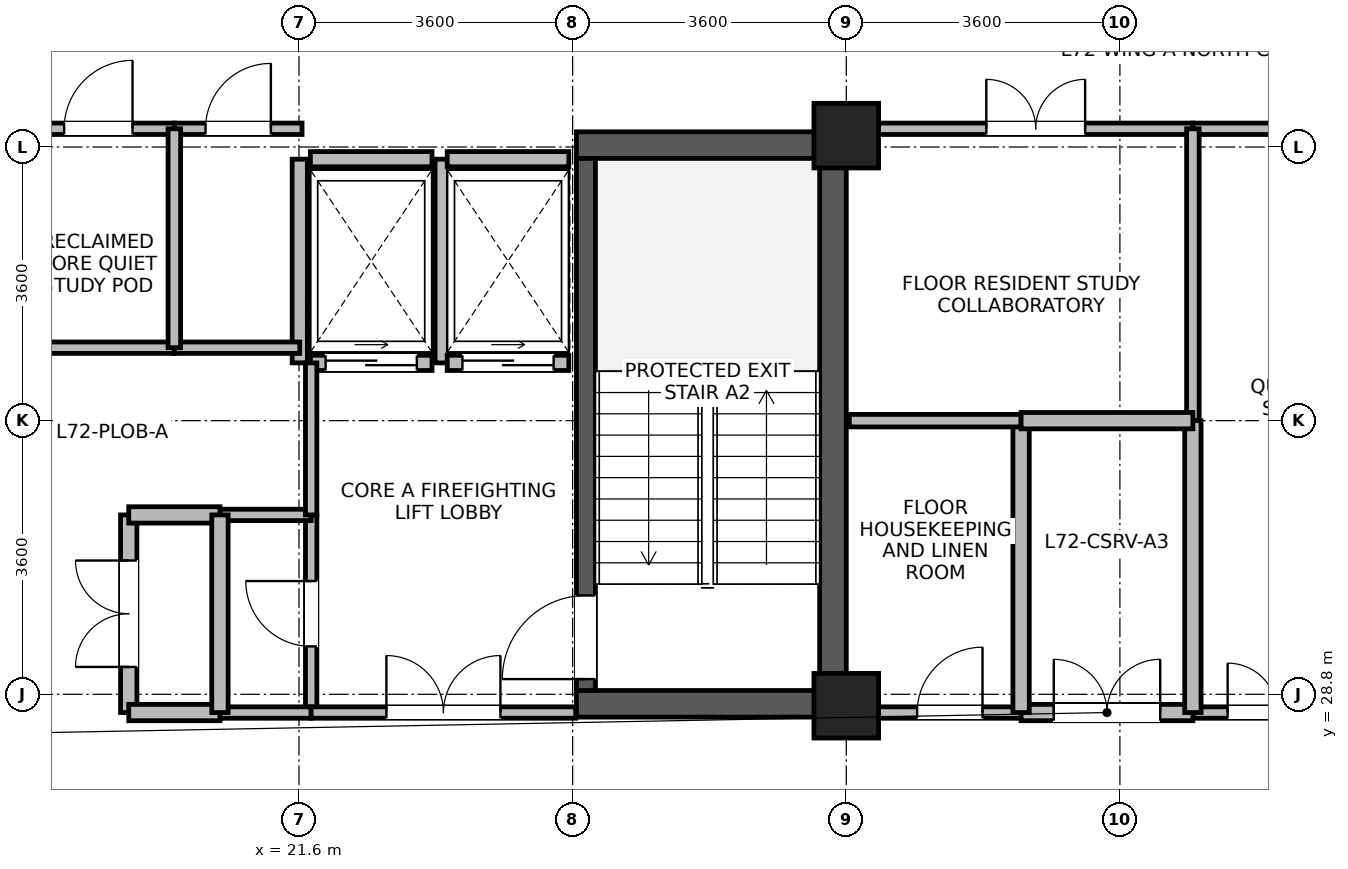
"""IFC4 building model, lengths in metres.
Left out: names, types, materials, properties, quantities, classifications, styles, units other than length and angle.
Written with IfcOpenShell. Run it as: python <this file> out.ifc"""

import sys

from ifc_helpers import new_model, si_unit, direction, frame, frame_2d, origin, origin_2d, place, context, subcontext, project, spatial, rectangle, extrude, source, transform, mapped, element, fill, save


model = new_model("IFC4")
c1 = context("Model", 3, precision=1e-05, world=origin(), true_north=direction((0.0, 1.0)))
c2 = subcontext(c1, "Body", "Model", "MODEL_VIEW")
j1 = project(units=[si_unit("LENGTHUNIT", "METRE"), si_unit("PLANEANGLEUNIT", "RADIAN")], contexts=[c1])
p1 = place(None, origin())
s1 = spatial("IfcSite", under=j1, at=p1, CompositionType="ELEMENT")
p2 = place(p1, origin())
s2 = spatial("IfcBuilding", under=s1, at=p2, CompositionType="ELEMENT")
p3 = place(p2, frame((0.0, 0.0, 279.5)))
s3 = spatial("IfcBuildingStorey", under=s2, at=p3, CompositionType="ELEMENT", Elevation=279.5)
p4 = place(p3, frame((28.625, 28.5, 0.0), z_axis=(0.0, 0.0, 1.0), x_axis=(0.0, 1.0, 0.0)))
e1 = element("IfcWall", 1, at=p4, inside=s3, PredefinedType="SHEAR", context=c2, shape_type="SweptSolid", body=[
    extrude(rectangle(XDim=7.7, YDim=0.35, at=frame_2d((3.85, 0.0))), origin(), (0.0, 0.0, 1.0), 3.475),
])
for number, where, z_axis, x_axis in (
    (2, (25.25, 28.675, 0.0), (0.0, 0.0, 1.0), (1.0, 0.0, 0.0)),
    (3, (25.25, 36.025, 0.0), (0.0, 0.0, 1.0), (1.0, 0.0, 0.0)),
):
    element("IfcWall", number, at=place(p3, frame(where, z_axis=z_axis, x_axis=x_axis)), inside=s3, PredefinedType="SHEAR", context=c2, shape_type="SweptSolid", body=[
        extrude(rectangle(XDim=3.2, YDim=0.35, at=frame_2d((1.6, 0.0))), origin(), (0.0, 0.0, 1.0), 3.475),
    ])
p5 = place(p3, frame((25.375, 28.85, 0.0), z_axis=(0.0, 0.0, 1.0), x_axis=(0.0, 1.0, 0.0)))
e4 = element("IfcWall", 4, at=p5, inside=s3, PredefinedType="SHEAR", context=c2, shape_type="SweptSolid", body=[
    extrude(rectangle(XDim=7.0, YDim=0.25, at=frame_2d((3.5, 0.0))), origin(), (0.0, 0.0, 1.0), 3.475),
])
p6 = place(p5, frame((0.15, 0.0, 0.0)))
e5 = element("IfcOpeningElement", 5, at=p6, cuts=e4, PredefinedType="OPENING", context=c2, shape_type="SweptSolid", body=[
    extrude(rectangle(XDim=1.1, YDim=2.08, at=frame_2d((0.55, 1.04))), frame((0.0, 0.135, 0.0), z_axis=(0.0, -1.0, 0.0), x_axis=(1.0, 0.0, 0.0)), (0.0, 0.0, 1.0), 0.27),
])
m1 = source(origin(), c2, "Body", "SweptSolid", [
    extrude(rectangle(XDim=0.85, YDim=0.85, at=origin_2d()), origin(), (0.0, 0.0, 1.0), 3.7),
])
for number, where, z_axis, x_axis in (
    (6, (28.8, 28.65, 0.0), (0.0, 0.0, 1.0), (1.0, 0.0, 0.0)),
    (7, (28.8, 36.15, 0.0), (0.0, 0.0, 1.0), (1.0, 0.0, 0.0)),
):
    element("IfcColumn", number, at=place(p3, frame(where, z_axis=z_axis, x_axis=x_axis)), inside=s3, PredefinedType="COLUMN", context=c2, shape_type="MappedRepresentation", body=[
        mapped(m1, transform((0.0, 0.0, 0.0), x_axis=(1.0, 0.0, 0.0), y_axis=(0.0, 1.0, 0.0), z_axis=(0.0, 0.0, 1.0), scale=1.0)),
    ])
p7 = place(p3, frame((21.75, 33.16, 0.0), z_axis=(0.0, 0.0, 1.0), x_axis=(1.0, 0.0, 0.0)))
e8 = element("IfcWall", 8, at=p7, inside=s3, PredefinedType="PARTITIONING", context=c2, shape_type="SweptSolid", body=[
    extrude(rectangle(XDim=1.6, YDim=0.2, at=frame_2d((0.8, 0.0))), origin(), (0.0, 0.0, 1.0), 3.455),
])
p8 = place(p7, frame((0.2, 0.0, 0.0)))
e9 = element("IfcOpeningElement", 9, at=p8, cuts=e8, PredefinedType="OPENING", context=c2, shape_type="SweptSolid", body=[
    extrude(rectangle(XDim=1.2, YDim=2.12, at=frame_2d((0.6, 1.06))), frame((0.0, 0.11, 0.0), z_axis=(0.0, -1.0, 0.0), x_axis=(1.0, 0.0, 0.0)), (0.0, 0.0, 1.0), 0.22),
])
p9 = place(p3, frame((21.75, 35.84, 0.0), z_axis=(0.0, 0.0, 1.0), x_axis=(1.0, 0.0, 0.0)))
e10 = element("IfcWall", 10, at=p9, inside=s3, PredefinedType="PARTITIONING", context=c2, shape_type="SweptSolid", body=[
    extrude(rectangle(XDim=1.6, YDim=0.2, at=frame_2d((0.8, 0.0))), origin(), (0.0, 0.0, 1.0), 2.555),
])
for number, where, z_axis, x_axis in (
    (11, (21.61, 33.16, 0.0), (0.0, 0.0, 1.0), (0.0, 1.0, 0.0)),
    (12, (23.49, 33.16, 0.0), (0.0, 0.0, 1.0), (0.0, 1.0, 0.0)),
):
    element("IfcWall", number, at=place(p3, frame(where, z_axis=z_axis, x_axis=x_axis)), inside=s3, PredefinedType="PARTITIONING", context=c2, shape_type="SweptSolid", body=[
        extrude(rectangle(XDim=2.68, YDim=0.2, at=frame_2d((1.34, 0.0))), origin(), (0.0, 0.0, 1.0), 3.455),
    ])
p10 = place(p3, frame((23.55, 33.16, 0.0), z_axis=(0.0, 0.0, 1.0), x_axis=(1.0, 0.0, 0.0)))
e13 = element("IfcWall", 13, at=p10, inside=s3, PredefinedType="PARTITIONING", context=c2, shape_type="SweptSolid", body=[
    extrude(rectangle(XDim=1.6, YDim=0.2, at=frame_2d((0.8, 0.0))), origin(), (0.0, 0.0, 1.0), 3.455),
])
p11 = place(p10, frame((0.2, 0.0, 0.0)))
e14 = element("IfcOpeningElement", 14, at=p11, cuts=e13, PredefinedType="OPENING", context=c2, shape_type="SweptSolid", body=[
    extrude(rectangle(XDim=1.2, YDim=2.12, at=frame_2d((0.6, 1.06))), frame((0.0, 0.11, 0.0), z_axis=(0.0, -1.0, 0.0), x_axis=(1.0, 0.0, 0.0)), (0.0, 0.0, 1.0), 0.22),
])
p12 = place(p3, frame((23.55, 35.84, 0.0), z_axis=(0.0, 0.0, 1.0), x_axis=(1.0, 0.0, 0.0)))
e15 = element("IfcWall", 15, at=p12, inside=s3, PredefinedType="PARTITIONING", context=c2, shape_type="SweptSolid", body=[
    extrude(rectangle(XDim=1.6, YDim=0.2, at=frame_2d((0.8, 0.0))), origin(), (0.0, 0.0, 1.0), 2.555),
])
p13 = place(p3, frame((29.225, 36.24, 0.0), z_axis=(0.0, 0.0, 1.0), x_axis=(1.0, 0.0, 0.0)))
e16 = element("IfcWall", 16, at=p13, inside=s3, PredefinedType="PARTITIONING", context=c2, shape_type="SweptSolid", body=[
    extrude(rectangle(XDim=4.135, YDim=0.15, at=frame_2d((2.067, 0.0))), origin(), (0.0, 0.0, 1.0), 2.905),
])
p14 = place(p13, frame((1.417, 0.0, 0.0)))
e17 = element("IfcOpeningElement", 17, at=p14, cuts=e16, PredefinedType="OPENING", context=c2, shape_type="SweptSolid", body=[
    extrude(rectangle(XDim=1.3, YDim=2.12, at=frame_2d((0.65, 1.06))), frame((0.0, 0.085, 0.0), z_axis=(0.0, -1.0, 0.0), x_axis=(1.0, 0.0, 0.0)), (0.0, 0.0, 1.0), 0.17),
])
p15 = place(p3, frame((33.36, 28.56, 0.0), z_axis=(0.0, 0.0, 1.0), x_axis=(1.0, 0.0, 0.0)))
e18 = element("IfcWall", 18, at=p15, inside=s3, PredefinedType="PARTITIONING", context=c2, shape_type="SweptSolid", body=[
    extrude(rectangle(XDim=2.215, YDim=0.15, at=frame_2d((1.107, 0.0))), origin(), (0.0, 0.0, 1.0), 2.905),
])
p16 = place(p15, frame((0.458, 0.0, 0.0)))
e19 = element("IfcOpeningElement", 19, at=p16, cuts=e18, PredefinedType="OPENING", context=c2, shape_type="SweptSolid", body=[
    extrude(rectangle(XDim=1.3, YDim=2.12, at=frame_2d((0.65, 1.06))), frame((0.0, 0.085, 0.0), z_axis=(0.0, -1.0, 0.0), x_axis=(1.0, 0.0, 0.0)), (0.0, 0.0, 1.0), 0.17),
])
p17 = place(p3, frame((33.36, 36.24, 0.0), z_axis=(0.0, 0.0, 1.0), x_axis=(1.0, 0.0, 0.0)))
e20 = element("IfcWall", 20, at=p17, inside=s3, PredefinedType="PARTITIONING", context=c2, shape_type="SweptSolid", body=[
    extrude(rectangle(XDim=2.215, YDim=0.15, at=frame_2d((1.107, 0.0))), origin(), (0.0, 0.0, 1.0), 2.905),
])
p18 = place(p3, frame((19.36, 28.56, 0.0), z_axis=(0.0, 0.0, 1.0), x_axis=(0.0, 1.0, 0.0)))
e21 = element("IfcWall", 21, at=p18, inside=s3, PredefinedType="PARTITIONING", context=c2, shape_type="SweptSolid", body=[
    extrude(rectangle(XDim=2.6, YDim=0.215, at=frame_2d((1.3, 0.0))), origin(), (0.0, 0.0, 1.0), 3.455),
])
p19 = place(p18, frame((0.6, 0.0, 0.0)))
e22 = element("IfcOpeningElement", 22, at=p19, cuts=e21, PredefinedType="OPENING", context=c2, shape_type="SweptSolid", body=[
    extrude(rectangle(XDim=1.4, YDim=2.15, at=frame_2d((0.7, 1.075))), frame((0.0, 0.118, 0.0), z_axis=(0.0, -1.0, 0.0), x_axis=(1.0, 0.0, 0.0)), (0.0, 0.0, 1.0), 0.235),
])
p20 = place(p3, frame((21.76, 28.56, 0.0), z_axis=(0.0, 0.0, 1.0), x_axis=(0.0, 1.0, 0.0)))
e23 = element("IfcWall", 23, at=p20, inside=s3, PredefinedType="PARTITIONING", context=c2, shape_type="SweptSolid", body=[
    extrude(rectangle(XDim=2.6, YDim=0.15, at=frame_2d((1.3, 0.0))), origin(), (0.0, 0.0, 1.0), 3.455),
])
p21 = place(p20, frame((0.87, 0.0, 0.0)))
e24 = element("IfcOpeningElement", 24, at=p21, cuts=e23, PredefinedType="OPENING", context=c2, shape_type="SweptSolid", body=[
    extrude(rectangle(XDim=0.86, YDim=2.02, at=frame_2d((0.43, 1.01))), frame((0.0, 0.085, 0.0), z_axis=(0.0, -1.0, 0.0), x_axis=(1.0, 0.0, 0.0)), (0.0, 0.0, 1.0), 0.17),
])
p22 = place(p3, frame((29.225, 28.56, 0.0), z_axis=(0.0, 0.0, 1.0), x_axis=(1.0, 0.0, 0.0)))
e25 = element("IfcWall", 25, at=p22, inside=s3, PredefinedType="PARTITIONING", context=c2, shape_type="SweptSolid", body=[
    extrude(rectangle(XDim=1.875, YDim=0.15, at=frame_2d((0.938, 0.0))), origin(), (0.0, 0.0, 1.0), 2.905),
])
p23 = place(p22, frame((0.508, 0.0, 0.0)))
e26 = element("IfcOpeningElement", 26, at=p23, cuts=e25, PredefinedType="OPENING", context=c2, shape_type="SweptSolid", body=[
    extrude(rectangle(XDim=0.86, YDim=2.02, at=frame_2d((0.43, 1.01))), frame((0.0, 0.085, 0.0), z_axis=(0.0, -1.0, 0.0), x_axis=(1.0, 0.0, 0.0)), (0.0, 0.0, 1.0), 0.17),
])
p24 = place(p3, frame((31.1, 28.56, 0.0), z_axis=(0.0, 0.0, 1.0), x_axis=(1.0, 0.0, 0.0)))
e27 = element("IfcWall", 27, at=p24, inside=s3, PredefinedType="PARTITIONING", context=c2, shape_type="SweptSolid", body=[
    extrude(rectangle(XDim=2.26, YDim=0.215, at=frame_2d((1.13, 0.0))), origin(), (0.0, 0.0, 1.0), 2.905),
])
p25 = place(p24, frame((0.43, 0.0, 0.0)))
e28 = element("IfcOpeningElement", 28, at=p25, cuts=e27, PredefinedType="OPENING", context=c2, shape_type="SweptSolid", body=[
    extrude(rectangle(XDim=1.4, YDim=2.15, at=frame_2d((0.7, 1.075))), frame((0.0, 0.118, 0.0), z_axis=(0.0, -1.0, 0.0), x_axis=(1.0, 0.0, 0.0)), (0.0, 0.0, 1.0), 0.235),
])
p26 = place(p3, frame((17.96, 33.36, 0.0), z_axis=(0.0, 0.0, 1.0), x_axis=(1.0, 0.0, 0.0)))
e29 = element("IfcWall", 29, at=p26, inside=s3, PredefinedType="PARTITIONING", context=c2, shape_type="SweptSolid", body=[
    extrude(rectangle(XDim=2.0, YDim=0.15, at=frame_2d((1.0, 0.0))), origin(), (0.0, 0.0, 1.0), 3.455),
])
p27 = place(p3, frame((17.96, 36.24, 0.0), z_axis=(0.0, 0.0, 1.0), x_axis=(1.0, 0.0, 0.0)))
e30 = element("IfcWall", 30, at=p27, inside=s3, PredefinedType="PARTITIONING", context=c2, shape_type="SweptSolid", body=[
    extrude(rectangle(XDim=2.0, YDim=0.15, at=frame_2d((1.0, 0.0))), origin(), (0.0, 0.0, 1.0), 2.555),
])
p28 = place(p27, frame((0.55, 0.0, 0.0)))
e31 = element("IfcOpeningElement", 31, at=p28, cuts=e30, PredefinedType="OPENING", context=c2, shape_type="SweptSolid", body=[
    extrude(rectangle(XDim=0.9, YDim=2.08, at=frame_2d((0.45, 1.04))), frame((0.0, 0.085, 0.0), z_axis=(0.0, -1.0, 0.0), x_axis=(1.0, 0.0, 0.0)), (0.0, 0.0, 1.0), 0.17),
])
p29 = place(p3, frame((19.96, 33.36, 0.0), z_axis=(0.0, 0.0, 1.0), x_axis=(1.0, 0.0, 0.0)))
e32 = element("IfcWall", 32, at=p29, inside=s3, PredefinedType="PARTITIONING", context=c2, shape_type="SweptSolid", body=[
    extrude(rectangle(XDim=1.65, YDim=0.15, at=frame_2d((0.825, 0.0))), origin(), (0.0, 0.0, 1.0), 3.455),
])
p30 = place(p3, frame((19.96, 36.24, 0.0), z_axis=(0.0, 0.0, 1.0), x_axis=(1.0, 0.0, 0.0)))
e33 = element("IfcWall", 33, at=p30, inside=s3, PredefinedType="PARTITIONING", context=c2, shape_type="SweptSolid", body=[
    extrude(rectangle(XDim=1.68, YDim=0.15, at=frame_2d((0.84, 0.0))), origin(), (0.0, 0.0, 1.0), 2.555),
])
p31 = place(p30, frame((0.41, 0.0, 0.0)))
e34 = element("IfcOpeningElement", 34, at=p31, cuts=e33, PredefinedType="OPENING", context=c2, shape_type="SweptSolid", body=[
    extrude(rectangle(XDim=0.86, YDim=2.02, at=frame_2d((0.43, 1.01))), frame((0.0, 0.085, 0.0), z_axis=(0.0, -1.0, 0.0), x_axis=(1.0, 0.0, 0.0)), (0.0, 0.0, 1.0), 0.17),
])
p32 = place(p3, frame((20.56, 28.56, 0.0), z_axis=(0.0, 0.0, 1.0), x_axis=(1.0, 0.0, 0.0)))
e35 = element("IfcWall", 35, at=p32, inside=s3, PredefinedType="PARTITIONING", context=c2, shape_type="SweptSolid", body=[
    extrude(rectangle(XDim=1.2, YDim=0.15, at=frame_2d((0.6, 0.0))), origin(), (0.0, 0.0, 1.0), 2.555),
])
p33 = place(p3, frame((20.56, 31.16, 0.0), z_axis=(0.0, 0.0, 1.0), x_axis=(1.0, 0.0, 0.0)))
e36 = element("IfcWall", 36, at=p33, inside=s3, PredefinedType="PARTITIONING", context=c2, shape_type="SweptSolid", body=[
    extrude(rectangle(XDim=1.2, YDim=0.15, at=frame_2d((0.6, 0.0))), origin(), (0.0, 0.0, 1.0), 3.455),
])
p34 = place(p3, frame((19.36, 28.56, 0.0), z_axis=(0.0, 0.0, 1.0), x_axis=(1.0, 0.0, 0.0)))
e37 = element("IfcWall", 37, at=p34, inside=s3, PredefinedType="PARTITIONING", context=c2, shape_type="SweptSolid", body=[
    extrude(rectangle(XDim=1.2, YDim=0.215, at=frame_2d((0.6, 0.0))), origin(), (0.0, 0.0, 1.0), 2.555),
])
p35 = place(p3, frame((19.36, 31.16, 0.0), z_axis=(0.0, 0.0, 1.0), x_axis=(1.0, 0.0, 0.0)))
e38 = element("IfcWall", 38, at=p35, inside=s3, PredefinedType="PARTITIONING", context=c2, shape_type="SweptSolid", body=[
    extrude(rectangle(XDim=1.2, YDim=0.215, at=frame_2d((0.6, 0.0))), origin(), (0.0, 0.0, 1.0), 3.455),
])
p36 = place(p3, frame((33.36, 32.4, 0.0), z_axis=(0.0, 0.0, 1.0), x_axis=(0.0, 1.0, 0.0)))
e39 = element("IfcWall", 39, at=p36, inside=s3, PredefinedType="PARTITIONING", context=c2, shape_type="SweptSolid", body=[
    extrude(rectangle(XDim=3.84, YDim=0.165, at=frame_2d((1.92, 0.0))), origin(), (0.0, 0.0, 1.0), 3.455),
])
for number, where, z_axis, x_axis in (
    (40, (31.1, 28.56, 0.0), (0.0, 0.0, 1.0), (0.0, 1.0, 0.0)),
    (41, (33.36, 28.56, 0.0), (0.0, 0.0, 1.0), (0.0, 1.0, 0.0)),
):
    element("IfcWall", number, at=place(p3, frame(where, z_axis=z_axis, x_axis=x_axis)), inside=s3, PredefinedType="PARTITIONING", context=c2, shape_type="SweptSolid", body=[
        extrude(rectangle(XDim=3.84, YDim=0.215, at=frame_2d((1.92, 0.0))), origin(), (0.0, 0.0, 1.0), 3.455),
    ])
p37 = place(p3, frame((21.76, 28.56, 0.0), z_axis=(0.0, 0.0, 1.0), x_axis=(1.0, 0.0, 0.0)))
e42 = element("IfcWall", 42, at=p37, inside=s3, PredefinedType="PARTITIONING", context=c2, shape_type="SweptSolid", body=[
    extrude(rectangle(XDim=3.48, YDim=0.15, at=frame_2d((1.74, 0.0))), origin(), (0.0, 0.0, 1.0), 2.555),
])
p38 = place(p37, frame((0.99, 0.0, 0.0)))
e43 = element("IfcOpeningElement", 43, at=p38, cuts=e42, PredefinedType="OPENING", context=c2, shape_type="SweptSolid", body=[
    extrude(rectangle(XDim=1.5, YDim=2.1, at=frame_2d((0.75, 1.05))), frame((0.0, 0.085, 0.0), z_axis=(0.0, -1.0, 0.0), x_axis=(1.0, 0.0, 0.0)), (0.0, 0.0, 1.0), 0.17),
])
p39 = place(p3, frame((19.96, 33.36, 0.0), z_axis=(0.0, 0.0, 1.0), x_axis=(0.0, 1.0, 0.0)))
e44 = element("IfcWall", 44, at=p39, inside=s3, PredefinedType="PARTITIONING", context=c2, shape_type="SweptSolid", body=[
    extrude(rectangle(XDim=2.88, YDim=0.165, at=frame_2d((1.44, 0.0))), origin(), (0.0, 0.0, 1.0), 3.455),
])
p40 = place(p3, frame((20.56, 28.56, 0.0), z_axis=(0.0, 0.0, 1.0), x_axis=(0.0, 1.0, 0.0)))
e45 = element("IfcWall", 45, at=p40, inside=s3, PredefinedType="PARTITIONING", context=c2, shape_type="SweptSolid", body=[
    extrude(rectangle(XDim=2.6, YDim=0.215, at=frame_2d((1.3, 0.0))), origin(), (0.0, 0.0, 1.0), 3.455),
])
p41 = place(p3, frame((28.84, 32.4, 0.0), z_axis=(0.0, 0.0, 1.0), x_axis=(1.0, 0.0, 0.0)))
e46 = element("IfcWall", 46, at=p41, inside=s3, PredefinedType="PARTITIONING", context=c2, shape_type="SweptSolid", body=[
    extrude(rectangle(XDim=2.26, YDim=0.165, at=frame_2d((1.13, 0.0))), origin(), (0.0, 0.0, 1.0), 3.455),
])
p42 = place(p3, frame((31.1, 32.4, 0.0), z_axis=(0.0, 0.0, 1.0), x_axis=(1.0, 0.0, 0.0)))
e47 = element("IfcWall", 47, at=p42, inside=s3, PredefinedType="PARTITIONING", context=c2, shape_type="SweptSolid", body=[
    extrude(rectangle(XDim=2.26, YDim=0.215, at=frame_2d((1.13, 0.0))), origin(), (0.0, 0.0, 1.0), 3.455),
])
p43 = place(p3, frame((21.76, 31.16, 0.0), z_axis=(0.0, 0.0, 1.0), x_axis=(0.0, 1.0, 0.0)))
e48 = element("IfcWall", 48, at=p43, inside=s3, PredefinedType="PARTITIONING", context=c2, shape_type="SweptSolid", body=[
    extrude(rectangle(XDim=2.0, YDim=0.15, at=frame_2d((1.0, 0.0))), origin(), (0.0, 0.0, 1.0), 3.455),
])
p44 = place(p6, origin())
e49 = element("IfcDoor", 49, at=p44, inside=s3, OperationType="SINGLE_SWING_LEFT", PredefinedType="DOOR", context=c2, shape_type="SweptSolid", body=[
    extrude(rectangle(XDim=1.1, YDim=2.08, at=frame_2d((0.55, 1.04))), frame((0.0, 0.025, 0.0), z_axis=(0.0, -1.0, 0.0), x_axis=(1.0, 0.0, 0.0)), (0.0, 0.0, 1.0), 0.05),
])
fill(e5, e49)
p45 = place(p8, origin())
e50 = element("IfcDoor", 50, at=p45, inside=s3, OperationType="SLIDING_TO_RIGHT", PredefinedType="DOOR", context=c2, shape_type="SweptSolid", body=[
    extrude(rectangle(XDim=1.2, YDim=2.12, at=frame_2d((0.6, 1.06))), frame((0.0, 0.025, 0.0), z_axis=(0.0, -1.0, 0.0), x_axis=(1.0, 0.0, 0.0)), (0.0, 0.0, 1.0), 0.05),
])
fill(e9, e50)
p46 = place(p11, origin())
e51 = element("IfcDoor", 51, at=p46, inside=s3, OperationType="SLIDING_TO_RIGHT", PredefinedType="DOOR", context=c2, shape_type="SweptSolid", body=[
    extrude(rectangle(XDim=1.2, YDim=2.12, at=frame_2d((0.6, 1.06))), frame((0.0, 0.025, 0.0), z_axis=(0.0, -1.0, 0.0), x_axis=(1.0, 0.0, 0.0)), (0.0, 0.0, 1.0), 0.05),
])
fill(e14, e51)
p47 = place(p14, origin())
e52 = element("IfcDoor", 52, at=p47, inside=s3, OperationType="DOUBLE_DOOR_SINGLE_SWING", PredefinedType="DOOR", context=c2, shape_type="SweptSolid", body=[
    extrude(rectangle(XDim=1.3, YDim=2.12, at=frame_2d((0.65, 1.06))), frame((0.0, 0.025, 0.0), z_axis=(0.0, -1.0, 0.0), x_axis=(1.0, 0.0, 0.0)), (0.0, 0.0, 1.0), 0.05),
])
fill(e17, e52)
p48 = place(p16, origin())
e53 = element("IfcDoor", 53, at=p48, inside=s3, OperationType="DOUBLE_DOOR_SINGLE_SWING", PredefinedType="DOOR", context=c2, shape_type="SweptSolid", body=[
    extrude(rectangle(XDim=1.3, YDim=2.12, at=frame_2d((0.65, 1.06))), frame((0.0, 0.025, 0.0), z_axis=(0.0, -1.0, 0.0), x_axis=(1.0, 0.0, 0.0)), (0.0, 0.0, 1.0), 0.05),
])
fill(e19, e53)
p49 = place(p19, origin())
e54 = element("IfcDoor", 54, at=p49, inside=s3, OperationType="DOUBLE_DOOR_SINGLE_SWING", PredefinedType="DOOR", context=c2, shape_type="SweptSolid", body=[
    extrude(rectangle(XDim=1.4, YDim=2.15, at=frame_2d((0.7, 1.075))), frame((0.0, 0.025, 0.0), z_axis=(0.0, -1.0, 0.0), x_axis=(1.0, 0.0, 0.0)), (0.0, 0.0, 1.0), 0.05),
])
fill(e22, e54)
p50 = place(p21, origin())
e55 = element("IfcDoor", 55, at=p50, inside=s3, OperationType="SINGLE_SWING_RIGHT", PredefinedType="DOOR", context=c2, shape_type="SweptSolid", body=[
    extrude(rectangle(XDim=0.86, YDim=2.02, at=frame_2d((0.43, 1.01))), frame((0.0, 0.025, 0.0), z_axis=(0.0, -1.0, 0.0), x_axis=(1.0, 0.0, 0.0)), (0.0, 0.0, 1.0), 0.05),
])
fill(e24, e55)
p51 = place(p23, origin())
e56 = element("IfcDoor", 56, at=p51, inside=s3, OperationType="SINGLE_SWING_RIGHT", PredefinedType="DOOR", context=c2, shape_type="SweptSolid", body=[
    extrude(rectangle(XDim=0.86, YDim=2.02, at=frame_2d((0.43, 1.01))), frame((0.0, 0.025, 0.0), z_axis=(0.0, -1.0, 0.0), x_axis=(1.0, 0.0, 0.0)), (0.0, 0.0, 1.0), 0.05),
])
fill(e26, e56)
p52 = place(p25, origin())
e57 = element("IfcDoor", 57, at=p52, inside=s3, OperationType="DOUBLE_DOOR_SINGLE_SWING", PredefinedType="DOOR", context=c2, shape_type="SweptSolid", body=[
    extrude(rectangle(XDim=1.4, YDim=2.15, at=frame_2d((0.7, 1.075))), frame((0.0, 0.025, 0.0), z_axis=(0.0, -1.0, 0.0), x_axis=(1.0, 0.0, 0.0)), (0.0, 0.0, 1.0), 0.05),
])
fill(e28, e57)
p53 = place(p28, origin())
e58 = element("IfcDoor", 58, at=p53, inside=s3, OperationType="SINGLE_SWING_RIGHT", PredefinedType="DOOR", context=c2, shape_type="SweptSolid", body=[
    extrude(rectangle(XDim=0.9, YDim=2.08, at=frame_2d((0.45, 1.04))), frame((0.0, 0.025, 0.0), z_axis=(0.0, -1.0, 0.0), x_axis=(1.0, 0.0, 0.0)), (0.0, 0.0, 1.0), 0.05),
])
fill(e31, e58)
p54 = place(p31, origin())
e59 = element("IfcDoor", 59, at=p54, inside=s3, OperationType="SINGLE_SWING_RIGHT", PredefinedType="DOOR", context=c2, shape_type="SweptSolid", body=[
    extrude(rectangle(XDim=0.86, YDim=2.02, at=frame_2d((0.43, 1.01))), frame((0.0, 0.025, 0.0), z_axis=(0.0, -1.0, 0.0), x_axis=(1.0, 0.0, 0.0)), (0.0, 0.0, 1.0), 0.05),
])
fill(e34, e59)
p55 = place(p38, origin())
e60 = element("IfcDoor", 60, at=p55, inside=s3, OperationType="DOUBLE_DOOR_SINGLE_SWING", PredefinedType="DOOR", context=c2, shape_type="SweptSolid", body=[
    extrude(rectangle(XDim=1.5, YDim=2.1, at=frame_2d((0.75, 1.05))), frame((0.0, 0.025, 0.0), z_axis=(0.0, -1.0, 0.0), x_axis=(1.0, 0.0, 0.0)), (0.0, 0.0, 1.0), 0.05),
])
fill(e43, e60)
save(model, sys.argv[1])
